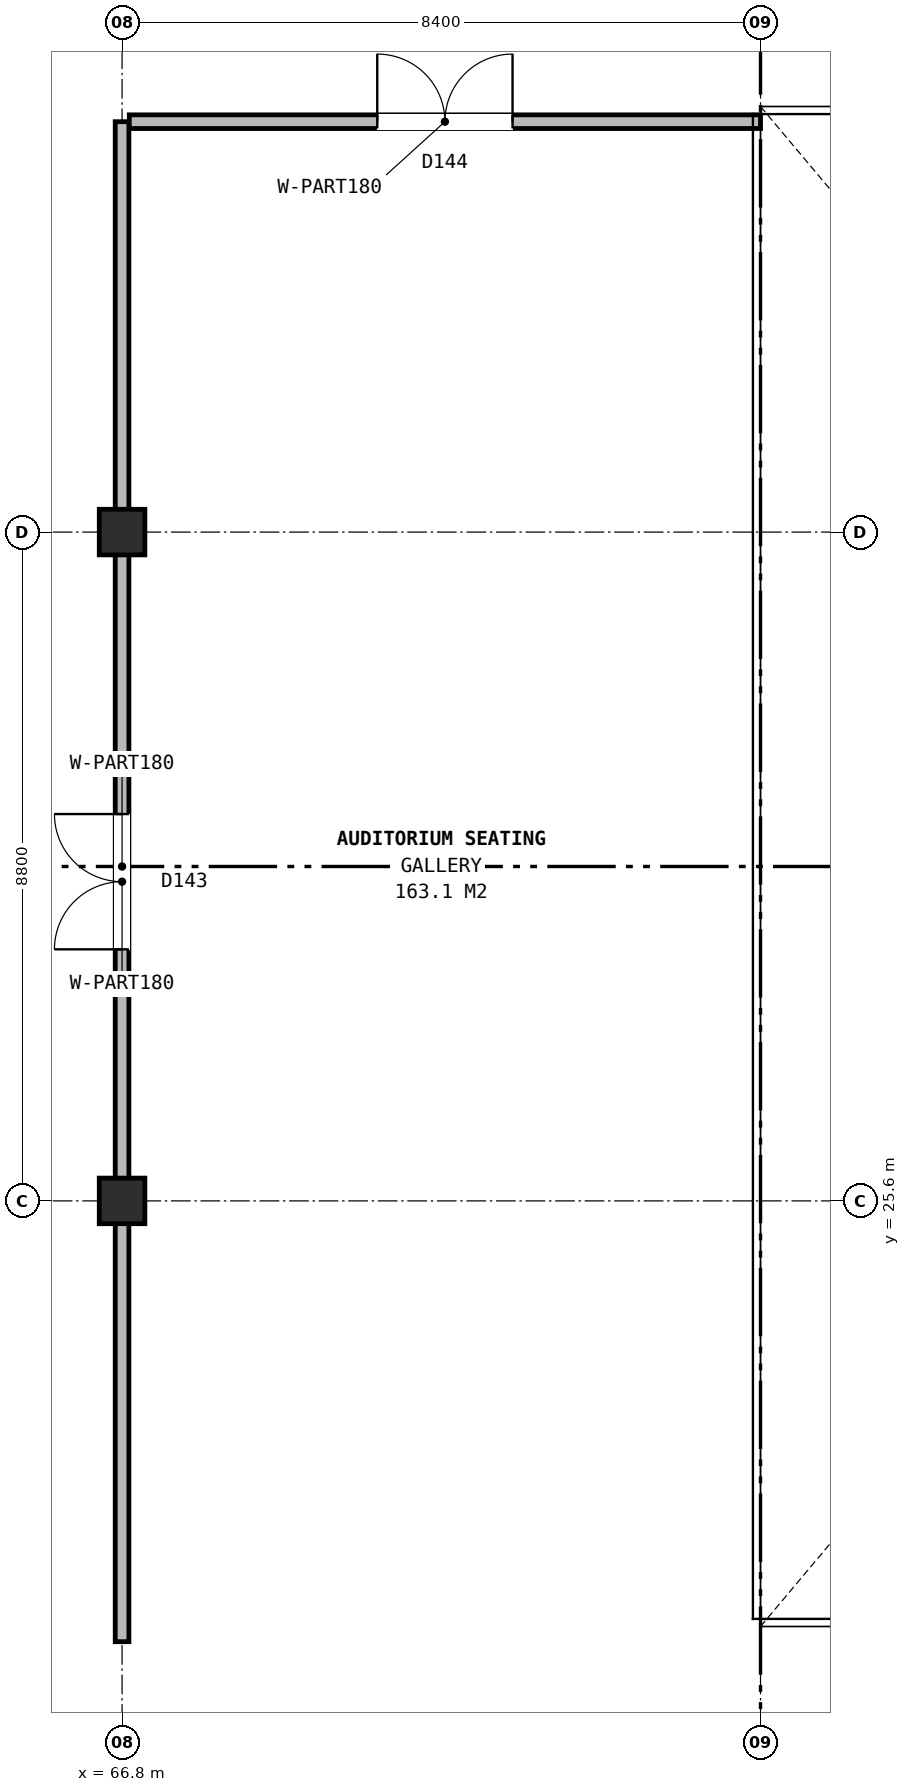
"""IFC4 building model, lengths in metres.
Left out: names, types, materials, properties, quantities, classifications, styles, units other than length and angle.
Written with IfcOpenShell. Run it as: python <this file> out.ifc"""

import sys

from ifc_helpers import new_model, si_unit, direction, frame, frame_2d, origin, origin_2d, place, context, subcontext, project, spatial, rectangle, extrude, element, fill, save


model = new_model("IFC4")
c1 = context("Model", 3, precision=1e-05, world=origin(), true_north=direction((0.0, 1.0)))
c2 = subcontext(c1, "Body", "Model", "MODEL_VIEW")
j1 = project(units=[si_unit("LENGTHUNIT", "METRE"), si_unit("PLANEANGLEUNIT", "RADIAN")], contexts=[c1])
p1 = place(None, origin())
s1 = spatial("IfcSite", under=j1, at=p1, CompositionType="ELEMENT")
p2 = place(p1, origin())
s2 = spatial("IfcBuilding", under=s1, at=p2, CompositionType="ELEMENT")
p3 = place(p2, frame((0.0, 0.0, 4.8)))
s3 = spatial("IfcBuildingStorey", under=s2, at=p3, CompositionType="ELEMENT", Elevation=4.8)
for number, where, z_axis, x_axis in (
    (1, (66.8, 25.6, 0.0), (0.0, 0.0, 1.0), (1.0, 0.0, 0.0)),
    (2, (66.8, 34.4, 0.0), (0.0, 0.0, 1.0), (1.0, 0.0, 0.0)),
):
    element("IfcColumn", number, at=place(p3, frame(where, z_axis=z_axis, x_axis=x_axis)), inside=s3, PredefinedType="COLUMN", context=c2, shape_type="SweptSolid", body=[
        extrude(rectangle(XDim=0.6, YDim=0.6, at=origin_2d()), origin(), (0.0, 0.0, 1.0), 4.2),
    ])
p4 = place(p3, frame((66.8, 19.8, 0.0), z_axis=(0.0, 0.0, 1.0), x_axis=(0.0, 1.0, 0.0)))
e3 = element("IfcWall", 3, at=p4, inside=s3, PredefinedType="PARTITIONING", context=c2, shape_type="SweptSolid", body=[
    extrude(rectangle(XDim=20.0, YDim=0.18, at=frame_2d((10.0, 0.0))), origin(), (0.0, 0.0, 1.0), 3.445),
])
p5 = place(p4, frame((9.11, 0.0, 0.0)))
e4 = element("IfcOpeningElement", 4, at=p5, cuts=e3, PredefinedType="OPENING", context=c2, shape_type="SweptSolid", body=[
    extrude(rectangle(XDim=1.78, YDim=2.3, at=frame_2d((0.89, 1.15))), frame((0.0, 0.1, 0.0), z_axis=(0.0, -1.0, 0.0), x_axis=(1.0, 0.0, 0.0)), (0.0, 0.0, 1.0), 0.2),
])
p6 = place(p3, frame((66.895, 39.8, 0.0), z_axis=(0.0, 0.0, 1.0), x_axis=(1.0, 0.0, 0.0)))
e5 = element("IfcWall", 5, at=p6, inside=s3, PredefinedType="PARTITIONING", context=c2, shape_type="SweptSolid", body=[
    extrude(rectangle(XDim=8.305, YDim=0.18, at=frame_2d((4.152, 0.0))), origin(), (0.0, 0.0, 1.0), 3.865),
])
p7 = place(p6, frame((3.262, 0.0, 0.0)))
e6 = element("IfcOpeningElement", 6, at=p7, cuts=e5, PredefinedType="OPENING", context=c2, shape_type="SweptSolid", body=[
    extrude(rectangle(XDim=1.78, YDim=2.3, at=frame_2d((0.89, 1.15))), frame((0.0, 0.1, 0.0), z_axis=(0.0, -1.0, 0.0), x_axis=(1.0, 0.0, 0.0)), (0.0, 0.0, 1.0), 0.2),
])
p8 = place(p5, origin())
e7 = element("IfcDoor", 7, at=p8, inside=s3, OperationType="DOUBLE_DOOR_SINGLE_SWING", PredefinedType="DOOR", context=c2, shape_type="SweptSolid", body=[
    extrude(rectangle(XDim=1.78, YDim=2.3, at=frame_2d((0.89, 1.15))), frame((0.0, 0.025, 0.0), z_axis=(0.0, -1.0, 0.0), x_axis=(1.0, 0.0, 0.0)), (0.0, 0.0, 1.0), 0.05),
])
fill(e4, e7)
p9 = place(p7, origin())
e8 = element("IfcDoor", 8, at=p9, inside=s3, OperationType="DOUBLE_DOOR_SINGLE_SWING", PredefinedType="DOOR", context=c2, shape_type="SweptSolid", body=[
    extrude(rectangle(XDim=1.78, YDim=2.3, at=frame_2d((0.89, 1.15))), frame((0.0, 0.025, 0.0), z_axis=(0.0, -1.0, 0.0), x_axis=(1.0, 0.0, 0.0)), (0.0, 0.0, 1.0), 0.05),
])
fill(e6, e8)
save(model, sys.argv[1])
